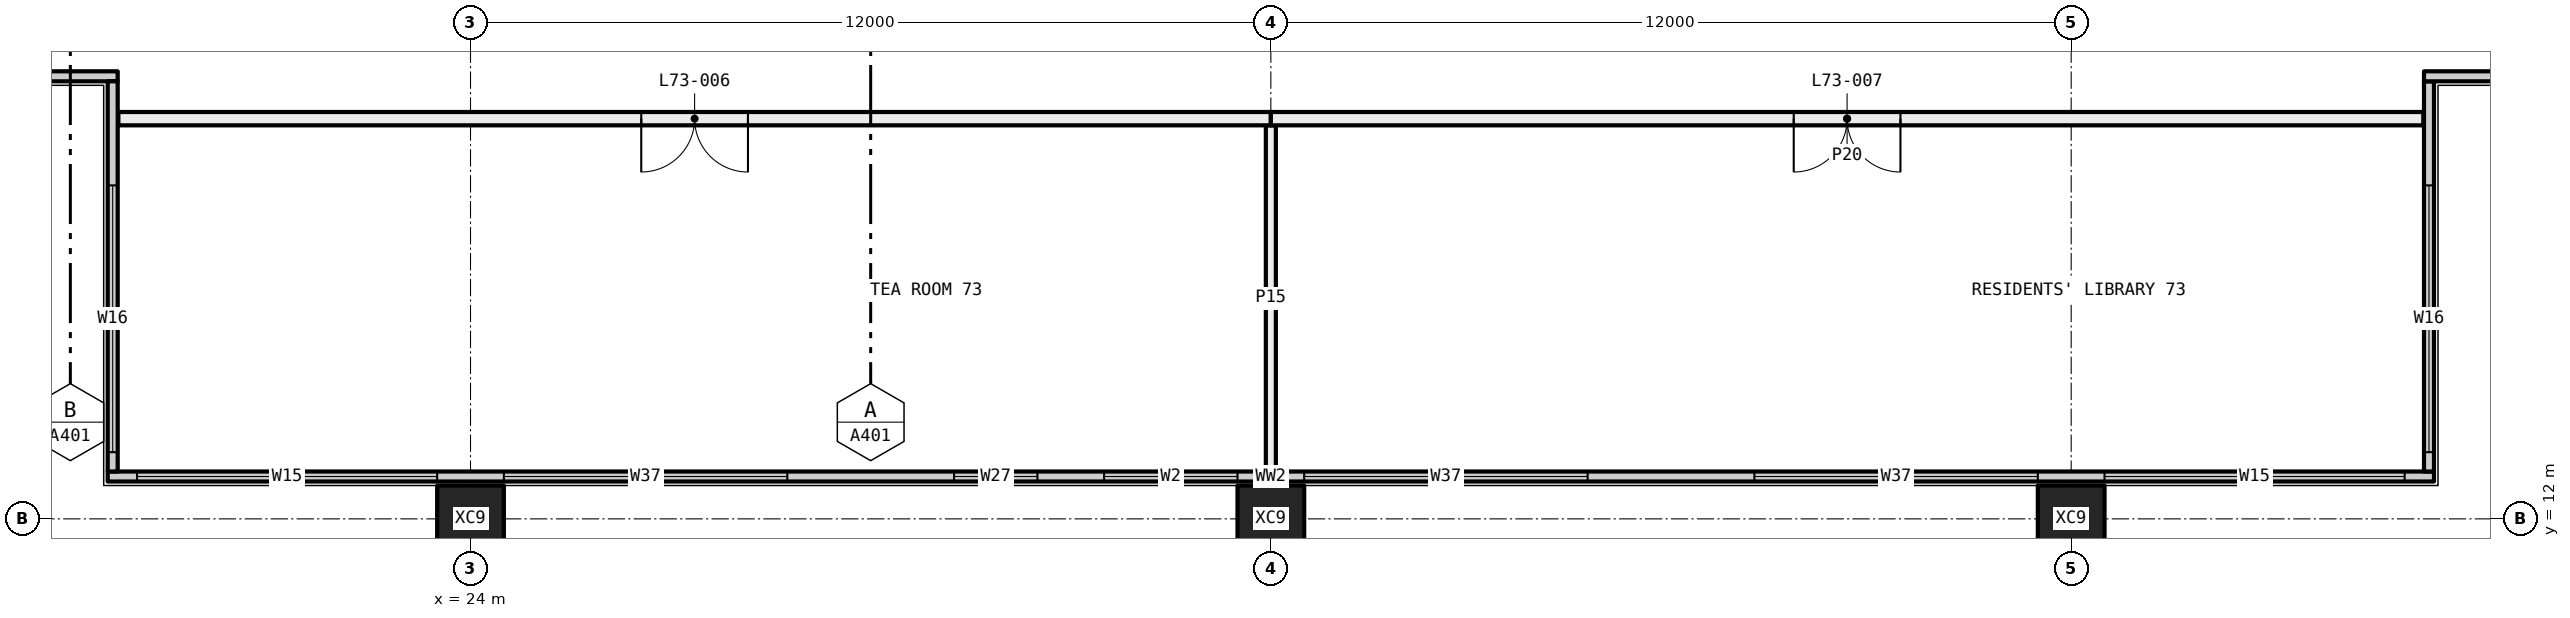
"""IFC4 building model, lengths in metres.
Left out: names, types, materials, properties, quantities, classifications, styles, units other than length and angle.
Written with IfcOpenShell. Run it as: python <this file> out.ifc"""

import sys

from ifc_helpers import new_model, si_unit, direction, frame, frame_2d, origin, origin_2d, place, context, subcontext, project, spatial, rectangle, hollow_rectangle, extrude, element, fill, save


model = new_model("IFC4")
c1 = context("Model", 3, precision=1e-05, world=origin(), true_north=direction((0.0, 1.0)))
c2 = subcontext(c1, "Body", "Model", "MODEL_VIEW")
j1 = project(units=[si_unit("LENGTHUNIT", "METRE"), si_unit("PLANEANGLEUNIT", "RADIAN")], contexts=[c1])
p1 = place(None, origin())
s1 = spatial("IfcSite", under=j1, at=p1, CompositionType="ELEMENT")
p2 = place(p1, origin())
s2 = spatial("IfcBuilding", under=s1, at=p2, CompositionType="ELEMENT")
p3 = place(p2, frame((0.0, 0.0, 269.7)))
s3 = spatial("IfcBuildingStorey", under=s2, at=p3, CompositionType="ELEMENT", Elevation=269.7)
for number, where, z_axis, x_axis in (
    (1, (24.0, 12.0, -0.4), (0.0, 0.0, 1.0), (1.0, 0.0, 0.0)),
    (2, (36.0, 12.0, -0.4), (0.0, 0.0, 1.0), (1.0, 0.0, 0.0)),
    (3, (48.0, 12.0, -0.4), (0.0, 0.0, 1.0), (1.0, 0.0, 0.0)),
):
    element("IfcColumn", number, at=place(p3, frame(where, z_axis=z_axis, x_axis=x_axis)), inside=s3, PredefinedType="COLUMN", context=c2, shape_type="SweptSolid", body=[
        extrude(hollow_rectangle(XDim=1.0, YDim=1.0, WallThickness=0.036, at=origin_2d()), origin(), (0.0, 0.0, 1.0), 3.45),
    ])
p4 = place(p3, frame((18.56, 12.635, 0.0), z_axis=(0.0, 0.0, 1.0), x_axis=(1.0, 0.0, 0.0)))
e4 = element("IfcWall", 4, at=p4, inside=s3, PredefinedType="ELEMENTEDWALL", context=c2, shape_type="SweptSolid", body=[
    extrude(rectangle(XDim=34.88, YDim=0.15, at=frame_2d((17.44, 0.0))), origin(), (0.0, 0.0, 1.0), 3.05),
])
p5 = place(p4, frame((0.44, 0.0, 0.45)))
e5 = element("IfcOpeningElement", 5, at=p5, cuts=e4, PredefinedType="OPENING", context=c2, shape_type="SweptSolid", body=[
    extrude(rectangle(XDim=4.5, YDim=2.55, at=frame_2d((2.25, 1.275))), frame((0.0, 0.085, 0.0), z_axis=(0.0, -1.0, 0.0), x_axis=(1.0, 0.0, 0.0)), (0.0, 0.0, 1.0), 0.17),
])
p6 = place(p4, frame((5.94, 0.0, 0.45)))
e6 = element("IfcOpeningElement", 6, at=p6, cuts=e4, PredefinedType="OPENING", context=c2, shape_type="SweptSolid", body=[
    extrude(rectangle(XDim=4.25, YDim=2.55, at=frame_2d((2.125, 1.275))), frame((0.0, 0.085, 0.0), z_axis=(0.0, -1.0, 0.0), x_axis=(1.0, 0.0, 0.0)), (0.0, 0.0, 1.0), 0.17),
])
p7 = place(p4, frame((12.69, 0.0, 0.45)))
e7 = element("IfcOpeningElement", 7, at=p7, cuts=e4, PredefinedType="OPENING", context=c2, shape_type="SweptSolid", body=[
    extrude(rectangle(XDim=1.25, YDim=2.55, at=frame_2d((0.625, 1.275))), frame((0.0, 0.085, 0.0), z_axis=(0.0, -1.0, 0.0), x_axis=(1.0, 0.0, 0.0)), (0.0, 0.0, 1.0), 0.17),
])
p8 = place(p4, frame((14.94, 0.0, 0.45)))
e8 = element("IfcOpeningElement", 8, at=p8, cuts=e4, PredefinedType="OPENING", context=c2, shape_type="SweptSolid", body=[
    extrude(rectangle(XDim=2.0, YDim=2.55, at=frame_2d((1.0, 1.275))), frame((0.0, 0.085, 0.0), z_axis=(0.0, -1.0, 0.0), x_axis=(1.0, 0.0, 0.0)), (0.0, 0.0, 1.0), 0.17),
])
p9 = place(p4, frame((17.94, 0.0, 0.45)))
e9 = element("IfcOpeningElement", 9, at=p9, cuts=e4, PredefinedType="OPENING", context=c2, shape_type="SweptSolid", body=[
    extrude(rectangle(XDim=4.25, YDim=2.55, at=frame_2d((2.125, 1.275))), frame((0.0, 0.085, 0.0), z_axis=(0.0, -1.0, 0.0), x_axis=(1.0, 0.0, 0.0)), (0.0, 0.0, 1.0), 0.17),
])
p10 = place(p4, frame((24.69, 0.0, 0.45)))
e10 = element("IfcOpeningElement", 10, at=p10, cuts=e4, PredefinedType="OPENING", context=c2, shape_type="SweptSolid", body=[
    extrude(rectangle(XDim=4.25, YDim=2.55, at=frame_2d((2.125, 1.275))), frame((0.0, 0.085, 0.0), z_axis=(0.0, -1.0, 0.0), x_axis=(1.0, 0.0, 0.0)), (0.0, 0.0, 1.0), 0.17),
])
p11 = place(p4, frame((29.94, 0.0, 0.45)))
e11 = element("IfcOpeningElement", 11, at=p11, cuts=e4, PredefinedType="OPENING", context=c2, shape_type="SweptSolid", body=[
    extrude(rectangle(XDim=4.5, YDim=2.55, at=frame_2d((2.25, 1.275))), frame((0.0, 0.085, 0.0), z_axis=(0.0, -1.0, 0.0), x_axis=(1.0, 0.0, 0.0)), (0.0, 0.0, 1.0), 0.17),
])
p12 = place(p3, frame((53.365, 12.71, 0.0), z_axis=(0.0, 0.0, 1.0), x_axis=(0.0, 1.0, 0.0)))
e12 = element("IfcWall", 12, at=p12, inside=s3, PredefinedType="ELEMENTEDWALL", context=c2, shape_type="SweptSolid", body=[
    extrude(rectangle(XDim=5.85, YDim=0.15, at=frame_2d((2.925, 0.0))), origin(), (0.0, 0.0, 1.0), 3.05),
])
p13 = place(p12, frame((0.29, 0.0, 0.45)))
e13 = element("IfcOpeningElement", 13, at=p13, cuts=e12, PredefinedType="OPENING", context=c2, shape_type="SweptSolid", body=[
    extrude(rectangle(XDim=4.0, YDim=2.55, at=frame_2d((2.0, 1.275))), frame((0.0, 0.085, 0.0), z_axis=(0.0, -1.0, 0.0), x_axis=(1.0, 0.0, 0.0)), (0.0, 0.0, 1.0), 0.17),
])
p14 = place(p3, frame((53.29, 18.635, 0.0), z_axis=(0.0, 0.0, 1.0), x_axis=(1.0, 0.0, 0.0)))
e14 = element("IfcWall", 14, at=p14, inside=s3, PredefinedType="ELEMENTEDWALL", context=c2, shape_type="SweptSolid", body=[
    extrude(rectangle(XDim=6.15, YDim=0.15, at=frame_2d((3.075, 0.0))), origin(), (0.0, 0.0, 1.0), 3.05),
])
p15 = place(p14, frame((1.71, 0.0, 0.45)))
e15 = element("IfcOpeningElement", 15, at=p15, cuts=e14, PredefinedType="OPENING", context=c2, shape_type="SweptSolid", body=[
    extrude(rectangle(XDim=4.0, YDim=2.55, at=frame_2d((2.0, 1.275))), frame((0.0, 0.085, 0.0), z_axis=(0.0, -1.0, 0.0), x_axis=(1.0, 0.0, 0.0)), (0.0, 0.0, 1.0), 0.17),
])
p16 = place(p3, frame((12.56, 18.635, 0.0), z_axis=(0.0, 0.0, 1.0), x_axis=(1.0, 0.0, 0.0)))
e16 = element("IfcWall", 16, at=p16, inside=s3, PredefinedType="ELEMENTEDWALL", context=c2, shape_type="SweptSolid", body=[
    extrude(rectangle(XDim=6.15, YDim=0.15, at=frame_2d((3.075, 0.0))), origin(), (0.0, 0.0, 1.0), 3.05),
])
p17 = place(p16, frame((0.44, 0.0, 0.45)))
e17 = element("IfcOpeningElement", 17, at=p17, cuts=e16, PredefinedType="OPENING", context=c2, shape_type="SweptSolid", body=[
    extrude(rectangle(XDim=4.0, YDim=2.55, at=frame_2d((2.0, 1.275))), frame((0.0, 0.085, 0.0), z_axis=(0.0, -1.0, 0.0), x_axis=(1.0, 0.0, 0.0)), (0.0, 0.0, 1.0), 0.17),
])
p18 = place(p3, frame((18.635, 12.71, 0.0), z_axis=(0.0, 0.0, 1.0), x_axis=(0.0, 1.0, 0.0)))
e18 = element("IfcWall", 18, at=p18, inside=s3, PredefinedType="ELEMENTEDWALL", context=c2, shape_type="SweptSolid", body=[
    extrude(rectangle(XDim=5.85, YDim=0.15, at=frame_2d((2.925, 0.0))), origin(), (0.0, 0.0, 1.0), 3.05),
])
p19 = place(p18, frame((0.29, 0.0, 0.45)))
e19 = element("IfcOpeningElement", 19, at=p19, cuts=e18, PredefinedType="OPENING", context=c2, shape_type="SweptSolid", body=[
    extrude(rectangle(XDim=4.0, YDim=2.55, at=frame_2d((2.0, 1.275))), frame((0.0, 0.085, 0.0), z_axis=(0.0, -1.0, 0.0), x_axis=(1.0, 0.0, 0.0)), (0.0, 0.0, 1.0), 0.17),
])
p20 = place(p3, frame((36.0, 12.72, 0.0), z_axis=(0.0, 0.0, 1.0), x_axis=(0.0, 1.0, 0.0)))
e20 = element("IfcWall", 20, at=p20, inside=s3, PredefinedType="PARTITIONING", context=c2, shape_type="SweptSolid", body=[
    extrude(rectangle(XDim=5.18, YDim=0.15, at=frame_2d((2.59, 0.0))), origin(), (0.0, 0.0, 1.0), 2.05),
])
p21 = place(p3, frame((36.0, 18.0, 0.0), z_axis=(0.0, 0.0, 1.0), x_axis=(-1.0, 0.0, 0.0)))
e21 = element("IfcWall", 21, at=p21, inside=s3, PredefinedType="PARTITIONING", context=c2, shape_type="SweptSolid", body=[
    extrude(rectangle(XDim=17.28, YDim=0.2, at=frame_2d((8.64, 0.0))), origin(), (0.0, 0.0, 1.0), 3.05),
])
p22 = place(p21, frame((7.84, 0.0, 0.0)))
e22 = element("IfcOpeningElement", 22, at=p22, cuts=e21, PredefinedType="OPENING", context=c2, shape_type="SweptSolid", body=[
    extrude(rectangle(XDim=1.6, YDim=2.1, at=frame_2d((0.8, 1.05))), frame((0.0, 0.11, 0.0), z_axis=(0.0, -1.0, 0.0), x_axis=(1.0, 0.0, 0.0)), (0.0, 0.0, 1.0), 0.22),
])
p23 = place(p3, frame((53.28, 18.0, 0.0), z_axis=(0.0, 0.0, 1.0), x_axis=(-1.0, 0.0, 0.0)))
e23 = element("IfcWall", 23, at=p23, inside=s3, PredefinedType="PARTITIONING", context=c2, shape_type="SweptSolid", body=[
    extrude(rectangle(XDim=17.28, YDim=0.2, at=frame_2d((8.64, 0.0))), origin(), (0.0, 0.0, 1.0), 3.05),
])
p24 = place(p23, frame((7.84, 0.0, 0.0)))
e24 = element("IfcOpeningElement", 24, at=p24, cuts=e23, PredefinedType="OPENING", context=c2, shape_type="SweptSolid", body=[
    extrude(rectangle(XDim=1.6, YDim=2.1, at=frame_2d((0.8, 1.05))), frame((0.0, 0.11, 0.0), z_axis=(0.0, -1.0, 0.0), x_axis=(1.0, 0.0, 0.0)), (0.0, 0.0, 1.0), 0.22),
])
p25 = place(p5, origin())
e25 = element("IfcWindow", 25, at=p25, inside=s3, PartitioningType="SINGLE_PANEL", PredefinedType="WINDOW", context=c2, shape_type="SweptSolid", body=[
    extrude(rectangle(XDim=4.5, YDim=2.55, at=frame_2d((2.25, 1.275))), frame((0.0, 0.03, 0.0), z_axis=(0.0, -1.0, 0.0), x_axis=(1.0, 0.0, 0.0)), (0.0, 0.0, 1.0), 0.06),
])
fill(e5, e25)
p26 = place(p6, origin())
e26 = element("IfcWindow", 26, at=p26, inside=s3, PartitioningType="SINGLE_PANEL", PredefinedType="WINDOW", context=c2, shape_type="SweptSolid", body=[
    extrude(rectangle(XDim=4.25, YDim=2.55, at=frame_2d((2.125, 1.275))), frame((0.0, 0.03, 0.0), z_axis=(0.0, -1.0, 0.0), x_axis=(1.0, 0.0, 0.0)), (0.0, 0.0, 1.0), 0.06),
])
fill(e6, e26)
p27 = place(p7, origin())
e27 = element("IfcWindow", 27, at=p27, inside=s3, PartitioningType="SINGLE_PANEL", PredefinedType="WINDOW", context=c2, shape_type="SweptSolid", body=[
    extrude(rectangle(XDim=1.25, YDim=2.55, at=frame_2d((0.625, 1.275))), frame((0.0, 0.03, 0.0), z_axis=(0.0, -1.0, 0.0), x_axis=(1.0, 0.0, 0.0)), (0.0, 0.0, 1.0), 0.06),
])
fill(e7, e27)
p28 = place(p8, origin())
e28 = element("IfcWindow", 28, at=p28, inside=s3, PartitioningType="SINGLE_PANEL", PredefinedType="WINDOW", context=c2, shape_type="SweptSolid", body=[
    extrude(rectangle(XDim=2.0, YDim=2.55, at=frame_2d((1.0, 1.275))), frame((0.0, 0.03, 0.0), z_axis=(0.0, -1.0, 0.0), x_axis=(1.0, 0.0, 0.0)), (0.0, 0.0, 1.0), 0.06),
])
fill(e8, e28)
p29 = place(p9, origin())
e29 = element("IfcWindow", 29, at=p29, inside=s3, PartitioningType="SINGLE_PANEL", PredefinedType="WINDOW", context=c2, shape_type="SweptSolid", body=[
    extrude(rectangle(XDim=4.25, YDim=2.55, at=frame_2d((2.125, 1.275))), frame((0.0, 0.03, 0.0), z_axis=(0.0, -1.0, 0.0), x_axis=(1.0, 0.0, 0.0)), (0.0, 0.0, 1.0), 0.06),
])
fill(e9, e29)
p30 = place(p10, origin())
e30 = element("IfcWindow", 30, at=p30, inside=s3, PartitioningType="SINGLE_PANEL", PredefinedType="WINDOW", context=c2, shape_type="SweptSolid", body=[
    extrude(rectangle(XDim=4.25, YDim=2.55, at=frame_2d((2.125, 1.275))), frame((0.0, 0.03, 0.0), z_axis=(0.0, -1.0, 0.0), x_axis=(1.0, 0.0, 0.0)), (0.0, 0.0, 1.0), 0.06),
])
fill(e10, e30)
p31 = place(p11, origin())
e31 = element("IfcWindow", 31, at=p31, inside=s3, PartitioningType="SINGLE_PANEL", PredefinedType="WINDOW", context=c2, shape_type="SweptSolid", body=[
    extrude(rectangle(XDim=4.5, YDim=2.55, at=frame_2d((2.25, 1.275))), frame((0.0, 0.03, 0.0), z_axis=(0.0, -1.0, 0.0), x_axis=(1.0, 0.0, 0.0)), (0.0, 0.0, 1.0), 0.06),
])
fill(e11, e31)
p32 = place(p13, origin())
e32 = element("IfcWindow", 32, at=p32, inside=s3, PartitioningType="SINGLE_PANEL", PredefinedType="WINDOW", context=c2, shape_type="SweptSolid", body=[
    extrude(rectangle(XDim=4.0, YDim=2.55, at=frame_2d((2.0, 1.275))), frame((0.0, 0.03, 0.0), z_axis=(0.0, -1.0, 0.0), x_axis=(1.0, 0.0, 0.0)), (0.0, 0.0, 1.0), 0.06),
])
fill(e13, e32)
p33 = place(p19, origin())
e33 = element("IfcWindow", 33, at=p33, inside=s3, PartitioningType="SINGLE_PANEL", PredefinedType="WINDOW", context=c2, shape_type="SweptSolid", body=[
    extrude(rectangle(XDim=4.0, YDim=2.55, at=frame_2d((2.0, 1.275))), frame((0.0, 0.03, 0.0), z_axis=(0.0, -1.0, 0.0), x_axis=(1.0, 0.0, 0.0)), (0.0, 0.0, 1.0), 0.06),
])
fill(e19, e33)
p34 = place(p22, origin())
e34 = element("IfcDoor", 34, at=p34, inside=s3, OperationType="DOUBLE_DOOR_SINGLE_SWING", PredefinedType="DOOR", context=c2, shape_type="SweptSolid", body=[
    extrude(rectangle(XDim=1.6, YDim=2.1, at=frame_2d((0.8, 1.05))), frame((0.0, 0.025, 0.0), z_axis=(0.0, -1.0, 0.0), x_axis=(1.0, 0.0, 0.0)), (0.0, 0.0, 1.0), 0.05),
])
fill(e22, e34)
p35 = place(p24, origin())
e35 = element("IfcDoor", 35, at=p35, inside=s3, OperationType="DOUBLE_DOOR_SINGLE_SWING", PredefinedType="DOOR", context=c2, shape_type="SweptSolid", body=[
    extrude(rectangle(XDim=1.6, YDim=2.1, at=frame_2d((0.8, 1.05))), frame((0.0, 0.025, 0.0), z_axis=(0.0, -1.0, 0.0), x_axis=(1.0, 0.0, 0.0)), (0.0, 0.0, 1.0), 0.05),
])
fill(e24, e35)
save(model, sys.argv[1])
